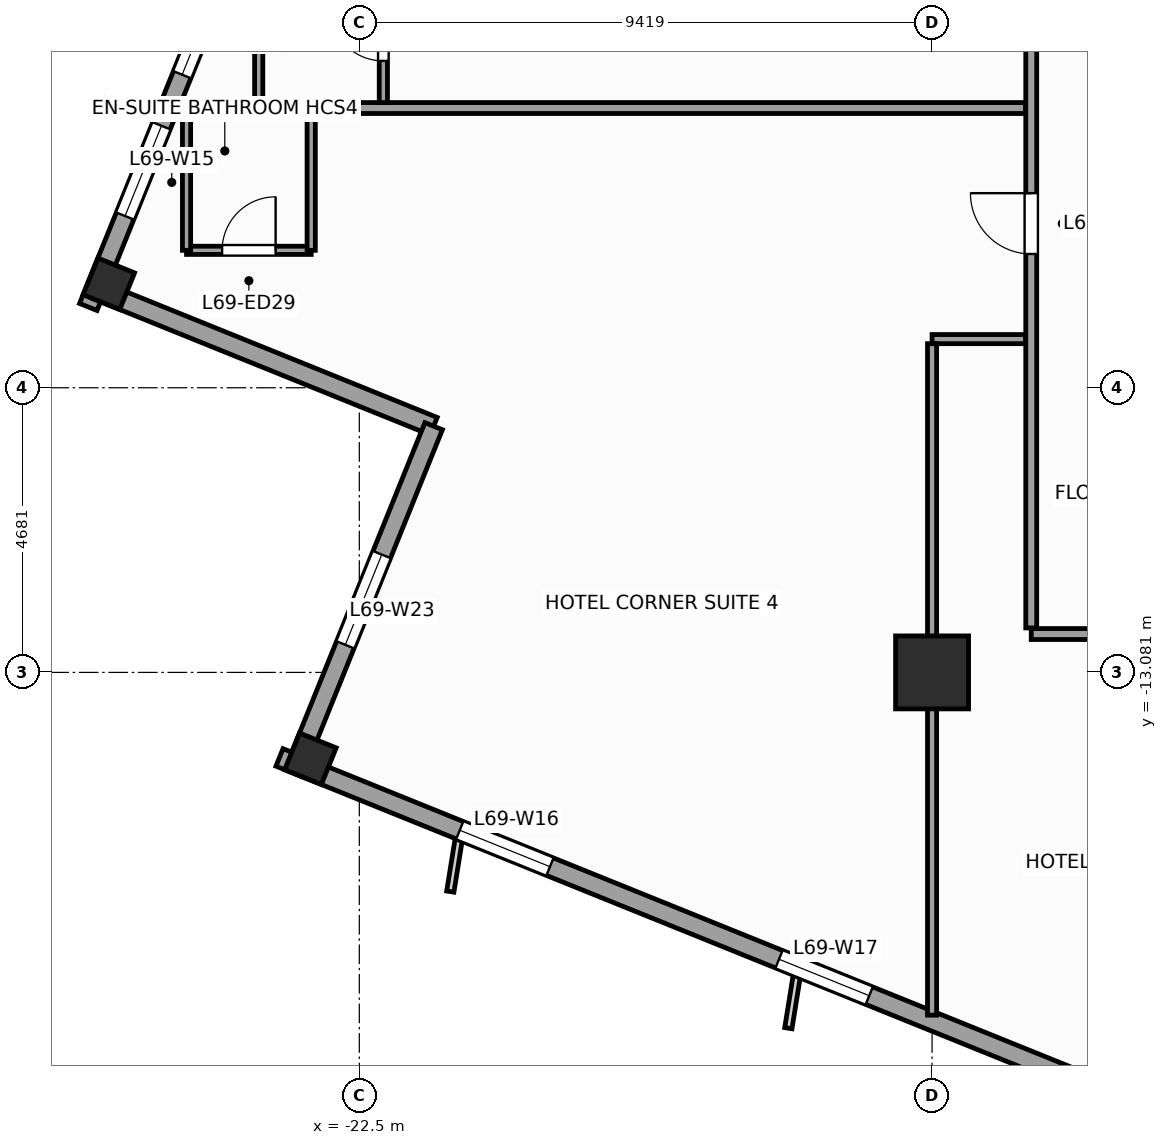
"""IFC4 building model, lengths in metres.
Left out: names, types, materials, properties, quantities, classifications, styles, units other than length and angle.
Written with IfcOpenShell. Run it as: python <this file> out.ifc"""

import sys

from ifc_helpers import new_model, si_unit, direction, frame, frame_2d, origin, origin_2d, place, context, subcontext, project, spatial, rectangle, extrude, source, transform, mapped, element, fill, save


model = new_model("IFC4")
c1 = context("Model", 3, precision=1e-05, world=origin(), true_north=direction((0.0, 1.0)))
c2 = subcontext(c1, "Body", "Model", "MODEL_VIEW")
j1 = project(units=[si_unit("LENGTHUNIT", "METRE"), si_unit("PLANEANGLEUNIT", "RADIAN")], contexts=[c1])
p1 = place(None, origin())
s1 = spatial("IfcSite", under=j1, at=p1, CompositionType="ELEMENT")
p2 = place(p1, origin())
s2 = spatial("IfcBuilding", under=s1, at=p2, CompositionType="ELEMENT")
p3 = place(p2, frame((0.0, 0.0, 283.2)))
s3 = spatial("IfcBuildingStorey", under=s2, at=p3, CompositionType="ELEMENT", Elevation=283.2)
m1 = source(origin(), c2, "Body", "SweptSolid", [
    extrude(rectangle(XDim=1.2, YDim=1.2, at=origin_2d()), origin(), (0.0, 0.0, 1.0), 3.6),
])
p4 = place(p3, frame((-13.081, -13.081, 0.0), z_axis=(0.0, 0.0, 1.0), x_axis=(1.0, 0.0, 0.0)))
e1 = element("IfcColumn", 1, at=p4, inside=s3, PredefinedType="COLUMN", context=c2, shape_type="MappedRepresentation", body=[
    mapped(m1, transform((0.0, 0.0, 0.0), scale=1.0)),
])
m2 = source(origin(), c2, "Body", "SweptSolid", [
    extrude(rectangle(XDim=0.65, YDim=0.65, at=origin_2d()), origin(), (0.0, 0.0, 1.0), 3.6),
])
for number, where, z_axis, x_axis in (
    (2, (-26.62, -6.69, 0.0), (0.0, 0.0, 1.0), (0.375, 0.927, 0.0)),
    (3, (-23.304, -14.501, 0.0), (0.0, 0.0, 1.0), (0.375, 0.927, 0.0)),
):
    element("IfcColumn", number, at=place(p3, frame(where, z_axis=z_axis, x_axis=x_axis)), inside=s3, PredefinedType="COLUMN", context=c2, shape_type="MappedRepresentation", body=[
        mapped(m2, transform((0.0, 0.0, 0.0), scale=1.0)),
    ])
p5 = place(p3, frame((-14.479, 23.813, 0.0), z_axis=(0.0, 0.0, 1.0), x_axis=(-0.374609557019, -0.927182657188, 0.0)))
e4 = element("IfcWall", 4, at=p5, inside=s3, PredefinedType="STANDARD", context=c2, shape_type="SweptSolid", body=[
    extrude(rectangle(XDim=33.31, YDim=0.31, at=frame_2d((16.655, 0.0))), origin(), (0.0, 0.0, 1.0), 2.75),
])
p6 = place(p5, frame((10.53, 0.0, 0.0)))
e5 = element("IfcOpeningElement", 5, at=p6, cuts=e4, PredefinedType="OPENING", context=c2, shape_type="SweptSolid", body=[
    extrude(rectangle(XDim=1.05, YDim=2.25, at=frame_2d((0.525, 1.125))), frame((0.0, 0.165, 0.0), z_axis=(0.0, -1.0, 0.0), x_axis=(1.0, 0.0, 0.0)), (0.0, 0.0, 1.0), 0.33),
])
p7 = place(p5, frame((3.197, 0.0, 0.47)))
e6 = element("IfcOpeningElement", 6, at=p7, cuts=e4, PredefinedType="OPENING", context=c2, shape_type="SweptSolid", body=[
    extrude(rectangle(XDim=1.6, YDim=2.1, at=frame_2d((0.8, 1.05))), frame((0.0, 0.165, 0.0), z_axis=(0.0, -1.0, 0.0), x_axis=(1.0, 0.0, 0.0)), (0.0, 0.0, 1.0), 0.33),
])
p8 = place(p5, frame((7.36, 0.0, 0.47)))
e7 = element("IfcOpeningElement", 7, at=p8, cuts=e4, PredefinedType="OPENING", context=c2, shape_type="SweptSolid", body=[
    extrude(rectangle(XDim=1.6, YDim=2.1, at=frame_2d((0.8, 1.05))), frame((0.0, 0.165, 0.0), z_axis=(0.0, -1.0, 0.0), x_axis=(1.0, 0.0, 0.0)), (0.0, 0.0, 1.0), 0.33),
])
p9 = place(p5, frame((14.439, 0.0, 0.47)))
e8 = element("IfcOpeningElement", 8, at=p9, cuts=e4, PredefinedType="OPENING", context=c2, shape_type="SweptSolid", body=[
    extrude(rectangle(XDim=1.6, YDim=2.1, at=frame_2d((0.8, 1.05))), frame((0.0, 0.165, 0.0), z_axis=(0.0, -1.0, 0.0), x_axis=(1.0, 0.0, 0.0)), (0.0, 0.0, 1.0), 0.33),
])
p10 = place(p5, frame((23.351, 0.0, 0.47)))
e9 = element("IfcOpeningElement", 9, at=p10, cuts=e4, PredefinedType="OPENING", context=c2, shape_type="SweptSolid", body=[
    extrude(rectangle(XDim=1.6, YDim=2.1, at=frame_2d((0.8, 1.05))), frame((0.0, 0.165, 0.0), z_axis=(0.0, -1.0, 0.0), x_axis=(1.0, 0.0, 0.0)), (0.0, 0.0, 1.0), 0.33),
])
p11 = place(p5, frame((30.097, 0.0, 0.47)))
e10 = element("IfcOpeningElement", 10, at=p11, cuts=e4, PredefinedType="OPENING", context=c2, shape_type="SweptSolid", body=[
    extrude(rectangle(XDim=1.6, YDim=2.1, at=frame_2d((0.8, 1.05))), frame((0.0, 0.165, 0.0), z_axis=(0.0, -1.0, 0.0), x_axis=(1.0, 0.0, 0.0)), (0.0, 0.0, 1.0), 0.33),
])
p12 = place(p5, frame((27.59, 0.0, 0.47)))
e11 = element("IfcOpeningElement", 11, at=p12, cuts=e4, PredefinedType="OPENING", context=c2, shape_type="SweptSolid", body=[
    extrude(rectangle(XDim=1.6, YDim=2.1, at=frame_2d((0.8, 1.05))), frame((0.0, 0.165, 0.0), z_axis=(0.0, -1.0, 0.0), x_axis=(1.0, 0.0, 0.0)), (0.0, 0.0, 1.0), 0.33),
])
p13 = place(p3, frame((-26.841, -6.784, 0.0), z_axis=(0.0, 0.0, 1.0), x_axis=(0.927171722085, -0.374636620962, 0.0)))
e12 = element("IfcWall", 12, at=p13, inside=s3, PredefinedType="STANDARD", context=c2, shape_type="SweptSolid", body=[
    extrude(rectangle(XDim=6.0, YDim=0.31, at=frame_2d((3.0, 0.0))), origin(), (0.0, 0.0, 1.0), 2.65),
])
p14 = place(p3, frame((-21.278, -9.032, 0.0), z_axis=(0.0, 0.0, 1.0), x_axis=(-0.374602739196, -0.927185411764, 0.0)))
e13 = element("IfcWall", 13, at=p14, inside=s3, PredefinedType="STANDARD", context=c2, shape_type="SweptSolid", body=[
    extrude(rectangle(XDim=6.155, YDim=0.31, at=frame_2d((3.078, 0.0))), origin(), (0.0, 0.0, 1.0), 3.35),
])
p15 = place(p14, frame((2.278, 0.0, 0.47)))
e14 = element("IfcOpeningElement", 14, at=p15, cuts=e13, PredefinedType="OPENING", context=c2, shape_type="SweptSolid", body=[
    extrude(rectangle(XDim=1.6, YDim=2.1, at=frame_2d((0.8, 1.05))), frame((0.0, 0.165, 0.0), z_axis=(0.0, -1.0, 0.0), x_axis=(1.0, 0.0, 0.0)), (0.0, 0.0, 1.0), 0.33),
])
p16 = place(p3, frame((-23.813, -14.479, 0.0), z_axis=(0.0, 0.0, 1.0), x_axis=(0.927182657188, -0.374609557019, 0.0)))
e15 = element("IfcWall", 15, at=p16, inside=s3, PredefinedType="STANDARD", context=c2, shape_type="SweptSolid", body=[
    extrude(rectangle(XDim=33.31, YDim=0.31, at=frame_2d((16.655, 0.0))), origin(), (0.0, 0.0, 1.0), 2.75),
])
p17 = place(p16, frame((3.197, 0.0, 0.47)))
e16 = element("IfcOpeningElement", 16, at=p17, cuts=e15, PredefinedType="OPENING", context=c2, shape_type="SweptSolid", body=[
    extrude(rectangle(XDim=1.6, YDim=2.1, at=frame_2d((0.8, 1.05))), frame((0.0, 0.165, 0.0), z_axis=(0.0, -1.0, 0.0), x_axis=(1.0, 0.0, 0.0)), (0.0, 0.0, 1.0), 0.33),
])
p18 = place(p16, frame((8.86, 0.0, 0.47)))
e17 = element("IfcOpeningElement", 17, at=p18, cuts=e15, PredefinedType="OPENING", context=c2, shape_type="SweptSolid", body=[
    extrude(rectangle(XDim=1.6, YDim=2.1, at=frame_2d((0.8, 1.05))), frame((0.0, 0.165, 0.0), z_axis=(0.0, -1.0, 0.0), x_axis=(1.0, 0.0, 0.0)), (0.0, 0.0, 1.0), 0.33),
])
p19 = place(p16, frame((14.439, 0.0, 0.47)))
e18 = element("IfcOpeningElement", 18, at=p19, cuts=e15, PredefinedType="OPENING", context=c2, shape_type="SweptSolid", body=[
    extrude(rectangle(XDim=1.6, YDim=2.1, at=frame_2d((0.8, 1.05))), frame((0.0, 0.165, 0.0), z_axis=(0.0, -1.0, 0.0), x_axis=(1.0, 0.0, 0.0)), (0.0, 0.0, 1.0), 0.33),
])
p20 = place(p16, frame((21.851, 0.0, 0.47)))
e19 = element("IfcOpeningElement", 19, at=p20, cuts=e15, PredefinedType="OPENING", context=c2, shape_type="SweptSolid", body=[
    extrude(rectangle(XDim=1.6, YDim=2.1, at=frame_2d((0.8, 1.05))), frame((0.0, 0.165, 0.0), z_axis=(0.0, -1.0, 0.0), x_axis=(1.0, 0.0, 0.0)), (0.0, 0.0, 1.0), 0.33),
])
p21 = place(p16, frame((27.847, 0.0, 0.47)))
e20 = element("IfcOpeningElement", 20, at=p21, cuts=e15, PredefinedType="OPENING", context=c2, shape_type="SweptSolid", body=[
    extrude(rectangle(XDim=1.6, YDim=2.1, at=frame_2d((0.8, 1.05))), frame((0.0, 0.165, 0.0), z_axis=(0.0, -1.0, 0.0), x_axis=(1.0, 0.0, 0.0)), (0.0, 0.0, 1.0), 0.33),
])
p22 = place(p3, frame((-11.45, -12.45, 0.0), z_axis=(0.0, 0.0, 1.0), x_axis=(1.0, 0.0, 0.0)))
e21 = element("IfcWall", 21, at=p22, inside=s3, PredefinedType="PARTITIONING", context=c2, shape_type="SweptSolid", body=[
    extrude(rectangle(XDim=21.75, YDim=0.18, at=frame_2d((10.875, 0.0))), origin(), (0.0, 0.0, 1.0), 3.35),
])
p23 = place(p22, frame((12.436, 0.0, 0.0)))
e22 = element("IfcOpeningElement", 22, at=p23, cuts=e21, PredefinedType="OPENING", context=c2, shape_type="SweptSolid", body=[
    extrude(rectangle(XDim=0.95, YDim=2.1, at=frame_2d((0.475, 1.05))), frame((0.0, 0.1, 0.0), z_axis=(0.0, -1.0, 0.0), x_axis=(1.0, 0.0, 0.0)), (0.0, 0.0, 1.0), 0.2),
])
p24 = place(p22, frame((18.186, 0.0, 0.0)))
e23 = element("IfcOpeningElement", 23, at=p24, cuts=e21, PredefinedType="OPENING", context=c2, shape_type="SweptSolid", body=[
    extrude(rectangle(XDim=1.0, YDim=2.15, at=frame_2d((0.5, 1.075))), frame((0.0, 0.1, 0.0), z_axis=(0.0, -1.0, 0.0), x_axis=(1.0, 0.0, 0.0)), (0.0, 0.0, 1.0), 0.2),
])
p25 = place(p22, frame((14.5, 0.0, 0.0)))
e24 = element("IfcOpeningElement", 24, at=p25, cuts=e21, PredefinedType="OPENING", context=c2, shape_type="SweptSolid", body=[
    extrude(rectangle(XDim=1.0, YDim=2.15, at=frame_2d((0.5, 1.075))), frame((0.0, 0.1, 0.0), z_axis=(0.0, -1.0, 0.0), x_axis=(1.0, 0.0, 0.0)), (0.0, 0.0, 1.0), 0.2),
])
p26 = place(p22, frame((8.7, 0.0, 0.0)))
e25 = element("IfcOpeningElement", 25, at=p26, cuts=e21, PredefinedType="OPENING", context=c2, shape_type="SweptSolid", body=[
    extrude(rectangle(XDim=1.0, YDim=2.15, at=frame_2d((0.5, 1.075))), frame((0.0, 0.1, 0.0), z_axis=(0.0, -1.0, 0.0), x_axis=(1.0, 0.0, 0.0)), (0.0, 0.0, 1.0), 0.2),
])
p27 = place(p22, frame((3.139, 0.0, 0.0)))
e26 = element("IfcOpeningElement", 26, at=p27, cuts=e21, PredefinedType="OPENING", context=c2, shape_type="SweptSolid", body=[
    extrude(rectangle(XDim=1.0, YDim=2.15, at=frame_2d((0.5, 1.075))), frame((0.0, 0.1, 0.0), z_axis=(0.0, -1.0, 0.0), x_axis=(1.0, 0.0, 0.0)), (0.0, 0.0, 1.0), 0.2),
])
p28 = place(p3, frame((-11.45, -12.35, 0.0), z_axis=(0.0, 0.0, 1.0), x_axis=(0.0, 1.0, 0.0)))
e27 = element("IfcWall", 27, at=p28, inside=s3, PredefinedType="PARTITIONING", context=c2, shape_type="SweptSolid", body=[
    extrude(rectangle(XDim=23.7, YDim=0.18, at=frame_2d((11.85, 0.0))), origin(), (0.0, 0.0, 1.0), 3.35),
])
p29 = place(p28, frame((13.75, 0.0, 0.0)))
e28 = element("IfcOpeningElement", 28, at=p29, cuts=e27, PredefinedType="OPENING", context=c2, shape_type="SweptSolid", body=[
    extrude(rectangle(XDim=1.0, YDim=2.15, at=frame_2d((0.5, 1.075))), frame((0.0, 0.1, 0.0), z_axis=(0.0, -1.0, 0.0), x_axis=(1.0, 0.0, 0.0)), (0.0, 0.0, 1.0), 0.2),
])
p30 = place(p28, frame((17.55, 0.0, 0.0)))
e29 = element("IfcOpeningElement", 29, at=p30, cuts=e27, PredefinedType="OPENING", context=c2, shape_type="SweptSolid", body=[
    extrude(rectangle(XDim=1.0, YDim=2.15, at=frame_2d((0.5, 1.075))), frame((0.0, 0.1, 0.0), z_axis=(0.0, -1.0, 0.0), x_axis=(1.0, 0.0, 0.0)), (0.0, 0.0, 1.0), 0.2),
])
p31 = place(p28, frame((6.15, 0.0, 0.0)))
e30 = element("IfcOpeningElement", 30, at=p31, cuts=e27, PredefinedType="OPENING", context=c2, shape_type="SweptSolid", body=[
    extrude(rectangle(XDim=1.0, YDim=2.15, at=frame_2d((0.5, 1.075))), frame((0.0, 0.1, 0.0), z_axis=(0.0, -1.0, 0.0), x_axis=(1.0, 0.0, 0.0)), (0.0, 0.0, 1.0), 0.2),
])
p32 = place(p28, frame((9.95, 0.0, 0.0)))
e31 = element("IfcOpeningElement", 31, at=p32, cuts=e27, PredefinedType="OPENING", context=c2, shape_type="SweptSolid", body=[
    extrude(rectangle(XDim=1.0, YDim=2.15, at=frame_2d((0.5, 1.075))), frame((0.0, 0.1, 0.0), z_axis=(0.0, -1.0, 0.0), x_axis=(1.0, 0.0, 0.0)), (0.0, 0.0, 1.0), 0.2),
])
p33 = place(p3, frame((-11.545, -3.8, 0.0), z_axis=(0.0, 0.0, 1.0), x_axis=(-1.0, 0.0, 0.0)))
e32 = element("IfcWall", 32, at=p33, inside=s3, PredefinedType="PARTITIONING", context=c2, shape_type="SweptSolid", body=[
    extrude(rectangle(XDim=13.993, YDim=0.18, at=frame_2d((6.997, 0.0))), origin(), (0.0, 0.0, 1.0), 3.35),
])
p34 = place(p3, frame((-11.545, -7.6, 0.0), z_axis=(0.0, 0.0, 1.0), x_axis=(-1.0, 0.0, 0.0)))
e33 = element("IfcWall", 33, at=p34, inside=s3, PredefinedType="PARTITIONING", context=c2, shape_type="SweptSolid", body=[
    extrude(rectangle(XDim=1.536, YDim=0.15, at=frame_2d((0.768, 0.0))), origin(), (0.0, 0.0, 1.0), 3.35),
])
p35 = place(p3, frame((-13.081, -7.675, 0.0), z_axis=(0.0, 0.0, 1.0), x_axis=(0.0, -1.0, 0.0)))
e34 = element("IfcWall", 34, at=p35, inside=s3, PredefinedType="PARTITIONING", context=c2, shape_type="SweptSolid", body=[
    extrude(rectangle(XDim=11.043, YDim=0.15, at=frame_2d((5.521, 0.0))), origin(), (0.0, 0.0, 1.0), 2.45),
])
p36 = place(p3, frame((-25.342, -6.14, 0.0), z_axis=(0.0, 0.0, 1.0), x_axis=(1.0, 0.0, 0.0)))
e35 = element("IfcWall", 35, at=p36, inside=s3, PredefinedType="PARTITIONING", context=c2, shape_type="SweptSolid", body=[
    extrude(rectangle(XDim=2.05, YDim=0.135, at=frame_2d((1.025, 0.0))), origin(), (0.0, 0.0, 1.0), 3.35),
])
p37 = place(p36, frame((0.585, 0.0, 0.0)))
e36 = element("IfcOpeningElement", 36, at=p37, cuts=e35, PredefinedType="OPENING", context=c2, shape_type="SweptSolid", body=[
    extrude(rectangle(XDim=0.88, YDim=2.1, at=frame_2d((0.44, 1.05))), frame((0.0, 0.078, 0.0), z_axis=(0.0, -1.0, 0.0), x_axis=(1.0, 0.0, 0.0)), (0.0, 0.0, 1.0), 0.155),
])
p38 = place(p3, frame((-23.292, -6.14, 0.0), z_axis=(0.0, 0.0, 1.0), x_axis=(0.0, 1.0, 0.0)))
e37 = element("IfcWall", 37, at=p38, inside=s3, PredefinedType="PARTITIONING", context=c2, shape_type="SweptSolid", body=[
    extrude(rectangle(XDim=2.25, YDim=0.135, at=frame_2d((1.125, 0.0))), origin(), (0.0, 0.0, 1.0), 2.95),
])
p39 = place(p3, frame((-25.342, -6.14, 0.0), z_axis=(0.0, 0.0, 1.0), x_axis=(0.0, 1.0, 0.0)))
e38 = element("IfcWall", 38, at=p39, inside=s3, PredefinedType="PARTITIONING", context=c2, shape_type="SweptSolid", body=[
    extrude(rectangle(XDim=2.25, YDim=0.135, at=frame_2d((1.125, 0.0))), origin(), (0.0, 0.0, 1.0), 2.75),
])
p40 = place(p3, frame((-22.105, -3.71, 0.0), z_axis=(0.0, 0.0, 1.0), x_axis=(0.0, 1.0, 0.0)))
e39 = element("IfcWall", 39, at=p40, inside=s3, PredefinedType="PARTITIONING", context=c2, shape_type="SweptSolid", body=[
    extrude(rectangle(XDim=2.25, YDim=0.135, at=frame_2d((1.125, 0.0))), origin(), (0.0, 0.0, 1.0), 3.35),
])
p41 = place(p40, frame((0.685, 0.0, 0.0)))
e40 = element("IfcOpeningElement", 40, at=p41, cuts=e39, PredefinedType="OPENING", context=c2, shape_type="SweptSolid", body=[
    extrude(rectangle(XDim=0.88, YDim=2.1, at=frame_2d((0.44, 1.05))), frame((0.0, 0.078, 0.0), z_axis=(0.0, -1.0, 0.0), x_axis=(1.0, 0.0, 0.0)), (0.0, 0.0, 1.0), 0.155),
])
p42 = place(p3, frame((-24.155, -3.71, 0.0), z_axis=(0.0, 0.0, 1.0), x_axis=(0.0, 1.0, 0.0)))
e41 = element("IfcWall", 41, at=p42, inside=s3, PredefinedType="PARTITIONING", context=c2, shape_type="SweptSolid", body=[
    extrude(rectangle(XDim=2.25, YDim=0.135, at=frame_2d((1.125, 0.0))), origin(), (0.0, 0.0, 1.0), 3.35),
])
m3 = source(origin(), c2, "Body", "SweptSolid", [
    extrude(rectangle(XDim=1.6, YDim=2.1, at=frame_2d((0.8, 1.05))), frame((0.0, 0.03, 0.0), z_axis=(0.0, -1.0, 0.0), x_axis=(1.0, 0.0, 0.0)), (0.0, 0.0, 1.0), 0.06),
])
p43 = place(p11, origin())
e42 = element("IfcWindow", 42, at=p43, inside=s3, PartitioningType="SINGLE_PANEL", PredefinedType="WINDOW", context=c2, shape_type="MappedRepresentation", body=[
    mapped(m3, transform((0.0, 0.0, 0.0), scale=1.0)),
])
fill(e10, e42)
p44 = place(p17, origin())
e43 = element("IfcWindow", 43, at=p44, inside=s3, PartitioningType="SINGLE_PANEL", PredefinedType="WINDOW", context=c2, shape_type="MappedRepresentation", body=[
    mapped(m3, transform((0.0, 0.0, 0.0), scale=1.0)),
])
fill(e16, e43)
p45 = place(p18, origin())
e44 = element("IfcWindow", 44, at=p45, inside=s3, PartitioningType="SINGLE_PANEL", PredefinedType="WINDOW", context=c2, shape_type="MappedRepresentation", body=[
    mapped(m3, transform((0.0, 0.0, 0.0), scale=1.0)),
])
fill(e17, e44)
p46 = place(p15, origin())
e45 = element("IfcWindow", 45, at=p46, inside=s3, PartitioningType="SINGLE_PANEL", PredefinedType="WINDOW", context=c2, shape_type="MappedRepresentation", body=[
    mapped(m3, transform((0.0, 0.0, 0.0), scale=1.0)),
])
fill(e14, e45)
m4 = source(origin(), c2, "Body", "SweptSolid", [
    extrude(rectangle(XDim=1.0, YDim=2.15, at=frame_2d((0.5, 1.075))), frame((0.0, 0.025, 0.0), z_axis=(0.0, -1.0, 0.0), x_axis=(1.0, 0.0, 0.0)), (0.0, 0.0, 1.0), 0.05),
])
p47 = place(p31, origin())
e46 = element("IfcDoor", 46, at=p47, inside=s3, OperationType="SINGLE_SWING_RIGHT", PredefinedType="DOOR", context=c2, shape_type="MappedRepresentation", body=[
    mapped(m4, transform((0.0, 0.0, 0.0), scale=1.0)),
])
fill(e30, e46)
m5 = source(origin(), c2, "Body", "SweptSolid", [
    extrude(rectangle(XDim=0.88, YDim=2.1, at=frame_2d((0.44, 1.05))), frame((0.0, 0.025, 0.0), z_axis=(0.0, -1.0, 0.0), x_axis=(1.0, 0.0, 0.0)), (0.0, 0.0, 1.0), 0.05),
])
p48 = place(p37, origin())
e47 = element("IfcDoor", 47, at=p48, inside=s3, OperationType="SINGLE_SWING_RIGHT", PredefinedType="DOOR", context=c2, shape_type="MappedRepresentation", body=[
    mapped(m5, transform((0.0, 0.0, 0.0), scale=1.0)),
])
fill(e36, e47)
p49 = place(p41, origin())
e48 = element("IfcDoor", 48, at=p49, inside=s3, OperationType="SINGLE_SWING_RIGHT", PredefinedType="DOOR", context=c2, shape_type="MappedRepresentation", body=[
    mapped(m5, transform((0.0, 0.0, 0.0), scale=1.0)),
])
fill(e40, e48)
p50 = place(p12, origin())
e49 = element("IfcWindow", 49, at=p50, inside=s3, PartitioningType="SINGLE_PANEL", PredefinedType="WINDOW", context=c2, shape_type="MappedRepresentation", body=[
    mapped(m3, transform((0.0, 0.0, 0.0), scale=1.0)),
])
fill(e11, e49)
save(model, sys.argv[1])
